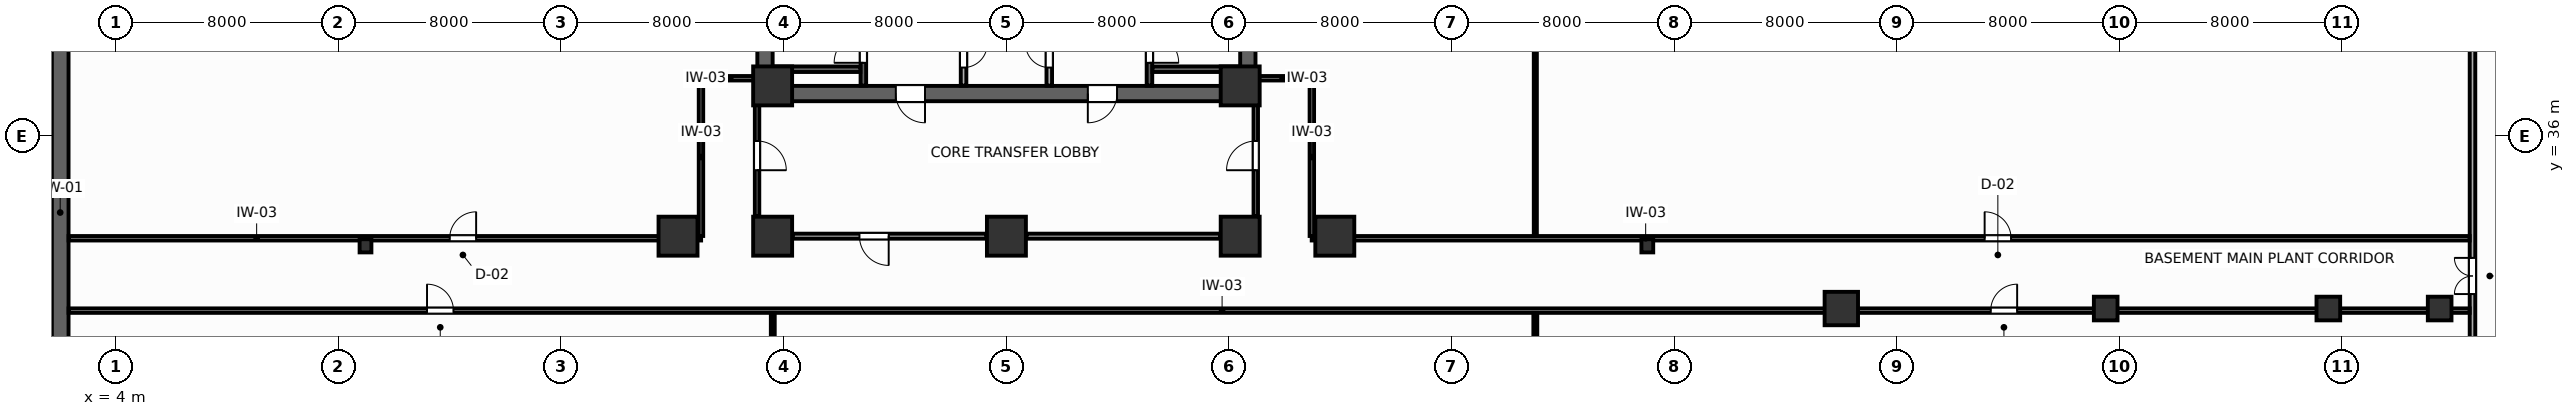
"""IFC4 building model, lengths in metres.
Left out: names, types, materials, properties, quantities, classifications, styles, units other than length and angle.
Written with IfcOpenShell. Run it as: python <this file> out.ifc"""

import sys

from ifc_helpers import new_model, si_unit, direction, frame, frame_2d, origin, origin_2d, place, context, subcontext, project, spatial, rectangle, i_section, extrude, source, transform, mapped, element, fill, save


model = new_model("IFC4")
c1 = context("Model", 3, precision=1e-05, world=origin(), true_north=direction((0.0, 1.0)))
c2 = subcontext(c1, "Body", "Model", "MODEL_VIEW")
j1 = project(units=[si_unit("LENGTHUNIT", "METRE"), si_unit("PLANEANGLEUNIT", "RADIAN")], contexts=[c1])
p1 = place(None, origin())
s1 = spatial("IfcSite", under=j1, at=p1, CompositionType="ELEMENT")
p2 = place(p1, origin())
s2 = spatial("IfcBuilding", under=s1, at=p2, CompositionType="ELEMENT")
p3 = place(p2, frame((0.0, 0.0, -9.0)))
s3 = spatial("IfcBuildingStorey", under=s2, at=p3, CompositionType="ELEMENT", Elevation=-9.0)
p4 = place(p3, frame((27.05, 37.525, 0.0), z_axis=(0.0, 0.0, 1.0), x_axis=(1.0, 0.0, 0.0)))
e1 = element("IfcWall", 1, at=p4, inside=s3, PredefinedType="SHEAR", context=c2, shape_type="SweptSolid", body=[
    extrude(rectangle(XDim=17.9, YDim=0.55, at=frame_2d((8.95, 0.0))), origin(), (0.0, 0.0, 1.0), 4.5),
])
p5 = place(p4, frame((4.975, 0.0, 0.0)))
e2 = element("IfcOpeningElement", 2, at=p5, cuts=e1, PredefinedType="OPENING", context=c2, shape_type="SweptSolid", body=[
    extrude(rectangle(XDim=1.05, YDim=2.1, at=frame_2d((0.525, 1.05))), frame((0.0, 0.285, 0.0), z_axis=(0.0, -1.0, 0.0), x_axis=(1.0, 0.0, 0.0)), (0.0, 0.0, 1.0), 0.57),
])
p6 = place(p4, frame((11.875, 0.0, 0.0)))
e3 = element("IfcOpeningElement", 3, at=p6, cuts=e1, PredefinedType="OPENING", context=c2, shape_type="SweptSolid", body=[
    extrude(rectangle(XDim=1.05, YDim=2.1, at=frame_2d((0.525, 1.05))), frame((0.0, 0.285, 0.0), z_axis=(0.0, -1.0, 0.0), x_axis=(1.0, 0.0, 0.0)), (0.0, 0.0, 1.0), 0.57),
])
for number, where, z_axis, x_axis in (
    (4, (27.325, 37.8, 0.0), (0.0, 0.0, 1.0), (0.0, 1.0, 0.0)),
    (5, (44.675, 37.8, 0.0), (0.0, 0.0, 1.0), (0.0, 1.0, 0.0)),
):
    element("IfcWall", number, at=place(p3, frame(where, z_axis=z_axis, x_axis=x_axis)), inside=s3, PredefinedType="SHEAR", context=c2, shape_type="SweptSolid", body=[
        extrude(rectangle(XDim=9.0, YDim=0.55, at=frame_2d((4.5, 0.0))), origin(), (0.0, 0.0, 1.0), 4.5),
    ])
p7 = place(p3, frame((2.0, 0.8, 0.0), z_axis=(0.0, 0.0, 1.0), x_axis=(0.0, 1.0, 0.0)))
e6 = element("IfcWall", 6, at=p7, inside=s3, PredefinedType="SOLIDWALL", context=c2, shape_type="SweptSolid", body=[
    extrude(rectangle(XDim=64.9, YDim=0.6, at=frame_2d((32.45, 0.0))), origin(), (0.0, 0.0, 1.0), 4.5),
])
m1 = source(origin(), c2, "Body", "SweptSolid", [
    extrude(rectangle(XDim=1.4, YDim=1.4, at=origin_2d()), origin(), (0.0, 0.0, 1.0), 4.5),
])
for number, where, z_axis, x_axis in (
    (7, (27.6, 37.8, 0.0), (0.0, 0.0, 1.0), (1.0, 0.0, 0.0)),
    (8, (44.4, 37.8, 0.0), (0.0, 0.0, 1.0), (1.0, 0.0, 0.0)),
    (9, (27.6, 32.4, 0.0), (0.0, 0.0, 1.0), (1.0, 0.0, 0.0)),
    (10, (44.4, 32.4, 0.0), (0.0, 0.0, 1.0), (1.0, 0.0, 0.0)),
    (11, (36.0, 32.4, 0.0), (0.0, 0.0, 1.0), (1.0, 0.0, 0.0)),
    (12, (24.2, 32.4, 0.0), (0.0, 0.0, 1.0), (1.0, 0.0, 0.0)),
    (13, (47.8, 32.4, 0.0), (0.0, 0.0, 1.0), (1.0, 0.0, 0.0)),
):
    element("IfcColumn", number, at=place(p3, frame(where, z_axis=z_axis, x_axis=x_axis)), inside=s3, PredefinedType="COLUMN", context=c2, shape_type="MappedRepresentation", body=[
        mapped(m1, transform((0.0, 0.0, 0.0), scale=1.0)),
    ])
m2 = source(origin(), c2, "Body", "SweptSolid", [
    extrude(rectangle(XDim=1.2, YDim=1.2, at=origin_2d()), origin(), (0.0, 0.0, 1.0), 4.5),
])
p8 = place(p3, frame((66.0, 29.8, 0.0), z_axis=(0.0, 0.0, 1.0), x_axis=(1.0, 0.0, 0.0)))
e14 = element("IfcColumn", 14, at=p8, inside=s3, PredefinedType="COLUMN", context=c2, shape_type="MappedRepresentation", body=[
    mapped(m2, transform((0.0, 0.0, 0.0), scale=1.0)),
])
m3 = source(origin(), c2, "Body", "SweptSolid", [
    extrude(i_section(OverallWidth=0.424, OverallDepth=0.474, WebThickness=0.045, FlangeThickness=0.072, FilletRadius=0.015, at=origin_2d()), origin(), (0.0, 0.0, 1.0), 4.5),
])
for number, where, z_axis, x_axis in (
    (15, (12.97, 32.054, 0.0), (0.0, 0.0, 1.0), (1.0, 0.0, 0.0)),
    (16, (59.03, 32.054, 0.0), (0.0, 0.0, 1.0), (1.0, 0.0, 0.0)),
):
    element("IfcColumn", number, at=place(p3, frame(where, z_axis=z_axis, x_axis=x_axis)), inside=s3, PredefinedType="COLUMN", context=c2, shape_type="MappedRepresentation", body=[
        mapped(m3, transform((0.0, 0.0, 0.0), scale=1.0)),
    ])
m4 = source(origin(), c2, "Body", "SweptSolid", [
    extrude(rectangle(XDim=0.85, YDim=0.85, at=origin_2d()), origin(), (0.0, 0.0, 1.0), 4.5),
])
for number, where, z_axis, x_axis in (
    (17, (75.5, 29.8, 0.0), (0.0, 0.0, 1.0), (1.0, 0.0, 0.0)),
    (18, (83.5, 29.8, 0.0), (0.0, 0.0, 1.0), (1.0, 0.0, 0.0)),
    (19, (87.5, 29.8, 0.0), (0.0, 0.0, 1.0), (1.0, 0.0, 0.0)),
):
    element("IfcColumn", number, at=place(p3, frame(where, z_axis=z_axis, x_axis=x_axis)), inside=s3, PredefinedType="COLUMN", context=c2, shape_type="MappedRepresentation", body=[
        mapped(m4, transform((0.0, 0.0, 0.0), scale=1.0)),
    ])
p9 = place(p3, frame((30.86, 37.81, 0.0), z_axis=(0.0, 0.0, 1.0), x_axis=(0.0, 1.0, 0.0)))
e20 = element("IfcWall", 20, at=p9, inside=s3, PredefinedType="SHEAR", context=c2, shape_type="SweptSolid", body=[
    extrude(rectangle(XDim=8.98, YDim=0.2, at=frame_2d((4.49, 0.0))), origin(), (0.0, 0.0, 1.0), 4.5),
])
p10 = place(p9, frame((0.82, 0.0, 0.0)))
e21 = element("IfcOpeningElement", 21, at=p10, cuts=e20, PredefinedType="OPENING", context=c2, shape_type="SweptSolid", body=[
    extrude(rectangle(XDim=1.05, YDim=2.1, at=frame_2d((0.525, 1.05))), frame((0.0, 0.11, 0.0), z_axis=(0.0, -1.0, 0.0), x_axis=(1.0, 0.0, 0.0)), (0.0, 0.0, 1.0), 0.22),
])
p11 = place(p3, frame((27.61, 38.4, 0.0), z_axis=(0.0, 0.0, 1.0), x_axis=(1.0, 0.0, 0.0)))
e22 = element("IfcWall", 22, at=p11, inside=s3, PredefinedType="SHEAR", context=c2, shape_type="SweptSolid", body=[
    extrude(rectangle(XDim=3.14, YDim=0.2, at=frame_2d((1.57, 0.0))), origin(), (0.0, 0.0, 1.0), 4.5),
])
p12 = place(p3, frame((41.14, 37.81, 0.0), z_axis=(0.0, 0.0, 1.0), x_axis=(0.0, 1.0, 0.0)))
e23 = element("IfcWall", 23, at=p12, inside=s3, PredefinedType="SHEAR", context=c2, shape_type="SweptSolid", body=[
    extrude(rectangle(XDim=8.98, YDim=0.2, at=frame_2d((4.49, 0.0))), origin(), (0.0, 0.0, 1.0), 4.5),
])
p13 = place(p12, frame((0.82, 0.0, 0.0)))
e24 = element("IfcOpeningElement", 24, at=p13, cuts=e23, PredefinedType="OPENING", context=c2, shape_type="SweptSolid", body=[
    extrude(rectangle(XDim=1.05, YDim=2.1, at=frame_2d((0.525, 1.05))), frame((0.0, 0.11, 0.0), z_axis=(0.0, -1.0, 0.0), x_axis=(1.0, 0.0, 0.0)), (0.0, 0.0, 1.0), 0.22),
])
p14 = place(p3, frame((41.25, 38.4, 0.0), z_axis=(0.0, 0.0, 1.0), x_axis=(1.0, 0.0, 0.0)))
e25 = element("IfcWall", 25, at=p14, inside=s3, PredefinedType="SHEAR", context=c2, shape_type="SweptSolid", body=[
    extrude(rectangle(XDim=3.14, YDim=0.2, at=frame_2d((1.57, 0.0))), origin(), (0.0, 0.0, 1.0), 4.5),
])
p15 = place(p3, frame((34.46, 37.81, 0.0), z_axis=(0.0, 0.0, 1.0), x_axis=(0.0, 1.0, 0.0)))
e26 = element("IfcWall", 26, at=p15, inside=s3, PredefinedType="PARTITIONING", context=c2, shape_type="SweptSolid", body=[
    extrude(rectangle(XDim=8.98, YDim=0.2, at=frame_2d((4.49, 0.0))), origin(), (0.0, 0.0, 1.0), 4.18),
])
p16 = place(p15, frame((0.65, 0.0, 0.0)))
e27 = element("IfcOpeningElement", 27, at=p16, cuts=e26, PredefinedType="OPENING", context=c2, shape_type="SweptSolid", body=[
    extrude(rectangle(XDim=0.85, YDim=2.05, at=frame_2d((0.425, 1.025))), frame((0.0, 0.11, 0.0), z_axis=(0.0, -1.0, 0.0), x_axis=(1.0, 0.0, 0.0)), (0.0, 0.0, 1.0), 0.22),
])
p17 = place(p3, frame((37.54, 37.81, 0.0), z_axis=(0.0, 0.0, 1.0), x_axis=(0.0, 1.0, 0.0)))
e28 = element("IfcWall", 28, at=p17, inside=s3, PredefinedType="PARTITIONING", context=c2, shape_type="SweptSolid", body=[
    extrude(rectangle(XDim=8.98, YDim=0.2, at=frame_2d((4.49, 0.0))), origin(), (0.0, 0.0, 1.0), 4.18),
])
p18 = place(p17, frame((0.65, 0.0, 0.0)))
e29 = element("IfcOpeningElement", 29, at=p18, cuts=e28, PredefinedType="OPENING", context=c2, shape_type="SweptSolid", body=[
    extrude(rectangle(XDim=0.85, YDim=2.05, at=frame_2d((0.425, 1.025))), frame((0.0, 0.11, 0.0), z_axis=(0.0, -1.0, 0.0), x_axis=(1.0, 0.0, 0.0)), (0.0, 0.0, 1.0), 0.22),
])
p19 = place(p3, frame((28.32, 32.4, 0.0), z_axis=(0.0, 0.0, 1.0), x_axis=(1.0, 0.0, 0.0)))
e30 = element("IfcWall", 30, at=p19, inside=s3, PredefinedType="PARTITIONING", context=c2, shape_type="SweptSolid", body=[
    extrude(rectangle(XDim=6.96, YDim=0.18, at=frame_2d((3.48, 0.0))), origin(), (0.0, 0.0, 1.0), 3.48),
])
p20 = place(p19, frame((2.4, 0.0, 0.0)))
e31 = element("IfcOpeningElement", 31, at=p20, cuts=e30, PredefinedType="OPENING", context=c2, shape_type="SweptSolid", body=[
    extrude(rectangle(XDim=1.05, YDim=2.1, at=frame_2d((0.525, 1.05))), frame((0.0, 0.1, 0.0), z_axis=(0.0, -1.0, 0.0), x_axis=(1.0, 0.0, 0.0)), (0.0, 0.0, 1.0), 0.2),
])
p21 = place(p3, frame((36.72, 32.4, 0.0), z_axis=(0.0, 0.0, 1.0), x_axis=(1.0, 0.0, 0.0)))
e32 = element("IfcWall", 32, at=p21, inside=s3, PredefinedType="PARTITIONING", context=c2, shape_type="SweptSolid", body=[
    extrude(rectangle(XDim=6.96, YDim=0.18, at=frame_2d((3.48, 0.0))), origin(), (0.0, 0.0, 1.0), 3.48),
])
p22 = place(p3, frame((27.04, 33.12, 0.0), z_axis=(0.0, 0.0, 1.0), x_axis=(0.0, 1.0, 0.0)))
e33 = element("IfcWall", 33, at=p22, inside=s3, PredefinedType="PARTITIONING", context=c2, shape_type="SweptSolid", body=[
    extrude(rectangle(XDim=4.38, YDim=0.16, at=frame_2d((2.19, 0.0))), origin(), (0.0, 0.0, 1.0), 4.18),
])
p23 = place(p22, frame((1.65, 0.0, 0.0)))
e34 = element("IfcOpeningElement", 34, at=p23, cuts=e33, PredefinedType="OPENING", context=c2, shape_type="SweptSolid", body=[
    extrude(rectangle(XDim=1.05, YDim=2.1, at=frame_2d((0.525, 1.05))), frame((0.0, 0.09, 0.0), z_axis=(0.0, -1.0, 0.0), x_axis=(1.0, 0.0, 0.0)), (0.0, 0.0, 1.0), 0.18),
])
p24 = place(p3, frame((44.96, 33.12, 0.0), z_axis=(0.0, 0.0, 1.0), x_axis=(0.0, 1.0, 0.0)))
e35 = element("IfcWall", 35, at=p24, inside=s3, PredefinedType="PARTITIONING", context=c2, shape_type="SweptSolid", body=[
    extrude(rectangle(XDim=4.38, YDim=0.16, at=frame_2d((2.19, 0.0))), origin(), (0.0, 0.0, 1.0), 4.18),
])
p25 = place(p24, frame((1.65, 0.0, 0.0)))
e36 = element("IfcOpeningElement", 36, at=p25, cuts=e35, PredefinedType="OPENING", context=c2, shape_type="SweptSolid", body=[
    extrude(rectangle(XDim=1.05, YDim=2.1, at=frame_2d((0.525, 1.05))), frame((0.0, 0.09, 0.0), z_axis=(0.0, -1.0, 0.0), x_axis=(1.0, 0.0, 0.0)), (0.0, 0.0, 1.0), 0.18),
])
p26 = place(p3, frame((88.68, 0.82, 0.0), z_axis=(0.0, 0.0, 1.0), x_axis=(0.0, 1.0, 0.0)))
e37 = element("IfcWall", 37, at=p26, inside=s3, PredefinedType="PARTITIONING", context=c2, shape_type="SweptSolid", body=[
    extrude(rectangle(XDim=64.86, YDim=0.2, at=frame_2d((32.43, 0.0))), origin(), (0.0, 0.0, 1.0), 4.18),
])
p27 = place(p26, frame((29.5, 0.0, 0.0)))
e38 = element("IfcOpeningElement", 38, at=p27, cuts=e37, PredefinedType="OPENING", context=c2, shape_type="SweptSolid", body=[
    extrude(rectangle(XDim=1.3, YDim=2.1, at=frame_2d((0.65, 1.05))), frame((0.0, 0.11, 0.0), z_axis=(0.0, -1.0, 0.0), x_axis=(1.0, 0.0, 0.0)), (0.0, 0.0, 1.0), 0.22),
])
p28 = place(p3, frame((2.302, 29.725, 0.0), z_axis=(0.0, 0.0, 1.0), x_axis=(1.0, 0.0, 0.0)))
e39 = element("IfcWall", 39, at=p28, inside=s3, PredefinedType="PARTITIONING", context=c2, shape_type="SweptSolid", body=[
    extrude(rectangle(XDim=86.276, YDim=0.16, at=frame_2d((43.138, 0.0))), origin(), (0.0, 0.0, 1.0), 3.69),
])
p29 = place(p28, frame((12.879, 0.0, 0.0)))
e40 = element("IfcOpeningElement", 40, at=p29, cuts=e39, PredefinedType="OPENING", context=c2, shape_type="SweptSolid", body=[
    extrude(rectangle(XDim=0.95, YDim=2.05, at=frame_2d((0.475, 1.025))), frame((0.0, 0.09, 0.0), z_axis=(0.0, -1.0, 0.0), x_axis=(1.0, 0.0, 0.0)), (0.0, 0.0, 1.0), 0.18),
])
p30 = place(p28, frame((69.066, 0.0, 0.0)))
e41 = element("IfcOpeningElement", 41, at=p30, cuts=e39, PredefinedType="OPENING", context=c2, shape_type="SweptSolid", body=[
    extrude(rectangle(XDim=0.95, YDim=2.05, at=frame_2d((0.475, 1.025))), frame((0.0, 0.09, 0.0), z_axis=(0.0, -1.0, 0.0), x_axis=(1.0, 0.0, 0.0)), (0.0, 0.0, 1.0), 0.18),
])
p31 = place(p3, frame((46.97, 32.325, 0.0), z_axis=(0.0, 0.0, 1.0), x_axis=(1.0, 0.0, 0.0)))
e42 = element("IfcWall", 42, at=p31, inside=s3, PredefinedType="PARTITIONING", context=c2, shape_type="SweptSolid", body=[
    extrude(rectangle(XDim=41.608, YDim=0.16, at=frame_2d((20.804, 0.0))), origin(), (0.0, 0.0, 1.0), 3.48),
])
p32 = place(p31, frame((24.18, 0.0, 0.0)))
e43 = element("IfcOpeningElement", 43, at=p32, cuts=e42, PredefinedType="OPENING", context=c2, shape_type="SweptSolid", body=[
    extrude(rectangle(XDim=0.95, YDim=2.05, at=frame_2d((0.475, 1.025))), frame((0.0, 0.09, 0.0), z_axis=(0.0, -1.0, 0.0), x_axis=(1.0, 0.0, 0.0)), (0.0, 0.0, 1.0), 0.18),
])
p33 = place(p3, frame((2.302, 32.325, 0.0), z_axis=(0.0, 0.0, 1.0), x_axis=(1.0, 0.0, 0.0)))
e44 = element("IfcWall", 44, at=p33, inside=s3, PredefinedType="PARTITIONING", context=c2, shape_type="SweptSolid", body=[
    extrude(rectangle(XDim=22.728, YDim=0.16, at=frame_2d((11.364, 0.0))), origin(), (0.0, 0.0, 1.0), 3.48),
])
p34 = place(p33, frame((13.694, 0.0, 0.0)))
e45 = element("IfcOpeningElement", 45, at=p34, cuts=e44, PredefinedType="OPENING", context=c2, shape_type="SweptSolid", body=[
    extrude(rectangle(XDim=0.95, YDim=2.05, at=frame_2d((0.475, 1.025))), frame((0.0, 0.09, 0.0), z_axis=(0.0, -1.0, 0.0), x_axis=(1.0, 0.0, 0.0)), (0.0, 0.0, 1.0), 0.18),
])
for number, where, z_axis, x_axis in (
    (46, (25.025, 32.407, 0.0), (0.0, 0.0, 1.0), (0.0, 1.0, 0.0)),
    (47, (46.975, 32.407, 0.0), (0.0, 0.0, 1.0), (0.0, 1.0, 0.0)),
):
    element("IfcWall", number, at=place(p3, frame(where, z_axis=z_axis, x_axis=x_axis)), inside=s3, PredefinedType="PARTITIONING", context=c2, shape_type="SweptSolid", body=[
        extrude(rectangle(XDim=5.673, YDim=0.16, at=frame_2d((2.836, 0.0))), origin(), (0.0, 0.0, 1.0), 4.18),
    ])
for number, where, z_axis, x_axis in (
    (48, (25.107, 38.075, 0.0), (0.0, 0.0, 1.0), (1.0, 0.0, 0.0)),
    (49, (44.952, 38.075, 0.0), (0.0, 0.0, 1.0), (1.0, 0.0, 0.0)),
):
    element("IfcWall", number, at=place(p3, frame(where, z_axis=z_axis, x_axis=x_axis)), inside=s3, PredefinedType="PARTITIONING", context=c2, shape_type="SweptSolid", body=[
        extrude(rectangle(XDim=1.941, YDim=0.16, at=frame_2d((0.971, 0.0))), origin(), (0.0, 0.0, 1.0), 4.18),
    ])
p35 = place(p3, frame((27.605, 0.802, 0.0), z_axis=(0.0, 0.0, 1.0), x_axis=(0.0, 1.0, 0.0)))
e50 = element("IfcWall", 50, at=p35, inside=s3, PredefinedType="PARTITIONING", context=c2, shape_type="SweptSolid", body=[
    extrude(rectangle(XDim=28.841, YDim=0.14, at=frame_2d((14.42, 0.0))), origin(), (0.0, 0.0, 1.0), 3.53),
])
p36 = place(p35, frame((14.054, 0.0, 0.0)))
e51 = element("IfcOpeningElement", 51, at=p36, cuts=e50, PredefinedType="OPENING", context=c2, shape_type="SweptSolid", body=[
    extrude(rectangle(XDim=0.95, YDim=2.05, at=frame_2d((0.475, 1.025))), frame((0.0, 0.08, 0.0), z_axis=(0.0, -1.0, 0.0), x_axis=(1.0, 0.0, 0.0)), (0.0, 0.0, 1.0), 0.16),
])
p37 = place(p3, frame((55.005, 0.802, 0.0), z_axis=(0.0, 0.0, 1.0), x_axis=(0.0, 1.0, 0.0)))
e52 = element("IfcWall", 52, at=p37, inside=s3, PredefinedType="PARTITIONING", context=c2, shape_type="SweptSolid", body=[
    extrude(rectangle(XDim=28.841, YDim=0.14, at=frame_2d((14.42, 0.0))), origin(), (0.0, 0.0, 1.0), 4.18),
])
p38 = place(p3, frame((55.005, 32.407, 0.0), z_axis=(0.0, 0.0, 1.0), x_axis=(0.0, 1.0, 0.0)))
e53 = element("IfcWall", 53, at=p38, inside=s3, PredefinedType="MOVABLE", context=c2, shape_type="SweptSolid", body=[
    extrude(rectangle(XDim=27.091, YDim=0.11, at=frame_2d((13.545, 0.0))), origin(), (0.0, 0.0, 1.0), 4.18),
])
p39 = place(p10, origin())
e54 = element("IfcDoor", 54, at=p39, inside=s3, OperationType="SINGLE_SWING_LEFT", PredefinedType="DOOR", context=c2, shape_type="SweptSolid", body=[
    extrude(rectangle(XDim=1.05, YDim=2.1, at=frame_2d((0.525, 1.05))), frame((0.0, 0.025, 0.0), z_axis=(0.0, -1.0, 0.0), x_axis=(1.0, 0.0, 0.0)), (0.0, 0.0, 1.0), 0.05),
])
fill(e21, e54)
p40 = place(p13, frame((1.05, 0.0, 0.0), z_axis=(0.0, 0.0, 1.0), x_axis=(-1.0, 0.0, 0.0)))
e55 = element("IfcDoor", 55, at=p40, inside=s3, OperationType="SINGLE_SWING_RIGHT", PredefinedType="DOOR", context=c2, shape_type="SweptSolid", body=[
    extrude(rectangle(XDim=1.05, YDim=2.1, at=frame_2d((0.525, 1.05))), frame((0.0, 0.025, 0.0), z_axis=(0.0, -1.0, 0.0), x_axis=(1.0, 0.0, 0.0)), (0.0, 0.0, 1.0), 0.05),
])
fill(e24, e55)
p41 = place(p16, frame((0.85, 0.0, 0.0), z_axis=(0.0, 0.0, 1.0), x_axis=(-1.0, 0.0, 0.0)))
e56 = element("IfcDoor", 56, at=p41, inside=s3, OperationType="SINGLE_SWING_LEFT", PredefinedType="DOOR", context=c2, shape_type="SweptSolid", body=[
    extrude(rectangle(XDim=0.85, YDim=2.05, at=frame_2d((0.425, 1.025))), frame((0.0, 0.025, 0.0), z_axis=(0.0, -1.0, 0.0), x_axis=(1.0, 0.0, 0.0)), (0.0, 0.0, 1.0), 0.05),
])
fill(e27, e56)
p42 = place(p18, origin())
e57 = element("IfcDoor", 57, at=p42, inside=s3, OperationType="SINGLE_SWING_RIGHT", PredefinedType="DOOR", context=c2, shape_type="SweptSolid", body=[
    extrude(rectangle(XDim=0.85, YDim=2.05, at=frame_2d((0.425, 1.025))), frame((0.0, 0.025, 0.0), z_axis=(0.0, -1.0, 0.0), x_axis=(1.0, 0.0, 0.0)), (0.0, 0.0, 1.0), 0.05),
])
fill(e29, e57)
p43 = place(p20, frame((1.05, 0.0, 0.0), z_axis=(0.0, 0.0, 1.0), x_axis=(-1.0, 0.0, 0.0)))
e58 = element("IfcDoor", 58, at=p43, inside=s3, OperationType="SINGLE_SWING_LEFT", PredefinedType="DOOR", context=c2, shape_type="SweptSolid", body=[
    extrude(rectangle(XDim=1.05, YDim=2.1, at=frame_2d((0.525, 1.05))), frame((0.0, 0.025, 0.0), z_axis=(0.0, -1.0, 0.0), x_axis=(1.0, 0.0, 0.0)), (0.0, 0.0, 1.0), 0.05),
])
fill(e31, e58)
p44 = place(p23, frame((1.05, 0.0, 0.0), z_axis=(0.0, 0.0, 1.0), x_axis=(-1.0, 0.0, 0.0)))
e59 = element("IfcDoor", 59, at=p44, inside=s3, OperationType="SINGLE_SWING_RIGHT", PredefinedType="DOOR", context=c2, shape_type="SweptSolid", body=[
    extrude(rectangle(XDim=1.05, YDim=2.1, at=frame_2d((0.525, 1.05))), frame((0.0, 0.025, 0.0), z_axis=(0.0, -1.0, 0.0), x_axis=(1.0, 0.0, 0.0)), (0.0, 0.0, 1.0), 0.05),
])
fill(e34, e59)
p45 = place(p25, origin())
e60 = element("IfcDoor", 60, at=p45, inside=s3, OperationType="SINGLE_SWING_LEFT", PredefinedType="DOOR", context=c2, shape_type="SweptSolid", body=[
    extrude(rectangle(XDim=1.05, YDim=2.1, at=frame_2d((0.525, 1.05))), frame((0.0, 0.025, 0.0), z_axis=(0.0, -1.0, 0.0), x_axis=(1.0, 0.0, 0.0)), (0.0, 0.0, 1.0), 0.05),
])
fill(e36, e60)
p46 = place(p27, origin())
e61 = element("IfcDoor", 61, at=p46, inside=s3, OperationType="DOUBLE_DOOR_SINGLE_SWING", PredefinedType="DOOR", context=c2, shape_type="SweptSolid", body=[
    extrude(rectangle(XDim=1.3, YDim=2.1, at=frame_2d((0.65, 1.05))), frame((0.0, 0.025, 0.0), z_axis=(0.0, -1.0, 0.0), x_axis=(1.0, 0.0, 0.0)), (0.0, 0.0, 1.0), 0.05),
])
fill(e38, e61)
p47 = place(p29, origin())
e62 = element("IfcDoor", 62, at=p47, inside=s3, OperationType="SINGLE_SWING_LEFT", PredefinedType="DOOR", context=c2, shape_type="SweptSolid", body=[
    extrude(rectangle(XDim=0.95, YDim=2.05, at=frame_2d((0.475, 1.025))), frame((0.0, 0.025, 0.0), z_axis=(0.0, -1.0, 0.0), x_axis=(1.0, 0.0, 0.0)), (0.0, 0.0, 1.0), 0.05),
])
fill(e40, e62)
p48 = place(p30, origin())
e63 = element("IfcDoor", 63, at=p48, inside=s3, OperationType="SINGLE_SWING_RIGHT", PredefinedType="DOOR", context=c2, shape_type="SweptSolid", body=[
    extrude(rectangle(XDim=0.95, YDim=2.05, at=frame_2d((0.475, 1.025))), frame((0.0, 0.025, 0.0), z_axis=(0.0, -1.0, 0.0), x_axis=(1.0, 0.0, 0.0)), (0.0, 0.0, 1.0), 0.05),
])
fill(e41, e63)
p49 = place(p32, origin())
e64 = element("IfcDoor", 64, at=p49, inside=s3, OperationType="SINGLE_SWING_LEFT", PredefinedType="DOOR", context=c2, shape_type="SweptSolid", body=[
    extrude(rectangle(XDim=0.95, YDim=2.05, at=frame_2d((0.475, 1.025))), frame((0.0, 0.025, 0.0), z_axis=(0.0, -1.0, 0.0), x_axis=(1.0, 0.0, 0.0)), (0.0, 0.0, 1.0), 0.05),
])
fill(e43, e64)
p50 = place(p34, origin())
e65 = element("IfcDoor", 65, at=p50, inside=s3, OperationType="SINGLE_SWING_RIGHT", PredefinedType="DOOR", context=c2, shape_type="SweptSolid", body=[
    extrude(rectangle(XDim=0.95, YDim=2.05, at=frame_2d((0.475, 1.025))), frame((0.0, 0.025, 0.0), z_axis=(0.0, -1.0, 0.0), x_axis=(1.0, 0.0, 0.0)), (0.0, 0.0, 1.0), 0.05),
])
fill(e45, e65)
p51 = place(p5, frame((1.05, 0.0, 0.0), z_axis=(0.0, 0.0, 1.0), x_axis=(-1.0, 0.0, 0.0)))
e66 = element("IfcDoor", 66, at=p51, inside=s3, OperationType="SINGLE_SWING_LEFT", PredefinedType="DOOR", context=c2, shape_type="SweptSolid", body=[
    extrude(rectangle(XDim=1.05, YDim=2.1, at=frame_2d((0.525, 1.05))), frame((0.0, 0.025, 0.0), z_axis=(0.0, -1.0, 0.0), x_axis=(1.0, 0.0, 0.0)), (0.0, 0.0, 1.0), 0.05),
])
fill(e2, e66)
p52 = place(p6, frame((1.05, 0.0, 0.0), z_axis=(0.0, 0.0, 1.0), x_axis=(-1.0, 0.0, 0.0)))
e67 = element("IfcDoor", 67, at=p52, inside=s3, OperationType="SINGLE_SWING_RIGHT", PredefinedType="DOOR", context=c2, shape_type="SweptSolid", body=[
    extrude(rectangle(XDim=1.05, YDim=2.1, at=frame_2d((0.525, 1.05))), frame((0.0, 0.025, 0.0), z_axis=(0.0, -1.0, 0.0), x_axis=(1.0, 0.0, 0.0)), (0.0, 0.0, 1.0), 0.05),
])
fill(e3, e67)
save(model, sys.argv[1])
